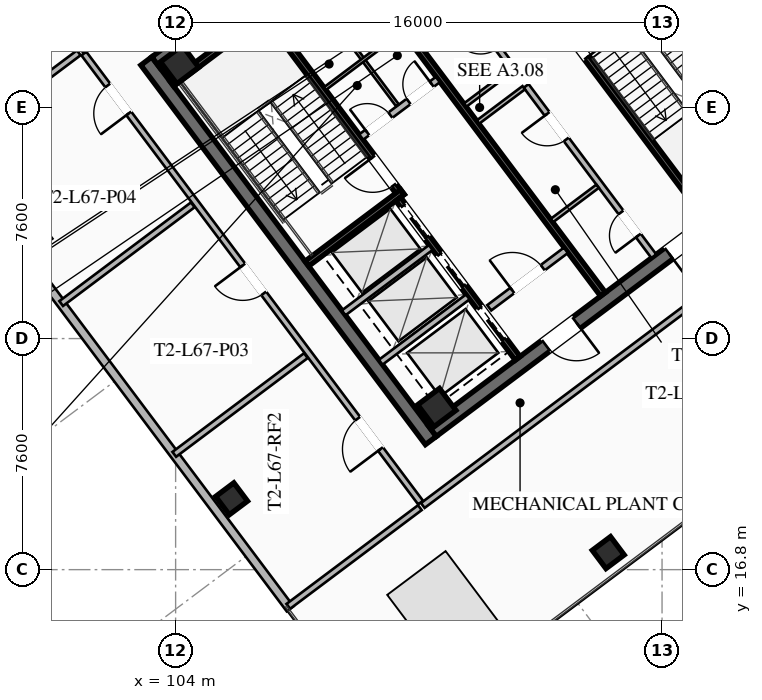
"""IFC4 building model, lengths in metres.
Left out: names, types, materials, properties, quantities, classifications, styles, units other than length and angle.
Written with IfcOpenShell. Run it as: python <this file> out.ifc"""

import sys

from ifc_helpers import new_model, si_unit, direction, frame, frame_2d, origin, origin_2d, place, context, subcontext, project, spatial, rectangle, hollow_rectangle, extrude, element, fill, save


model = new_model("IFC4")
c1 = context("Model", 3, precision=1e-05, world=origin(), true_north=direction((0.0, 1.0)))
c2 = subcontext(c1, "Body", "Model", "MODEL_VIEW")
j1 = project(units=[si_unit("LENGTHUNIT", "METRE"), si_unit("PLANEANGLEUNIT", "RADIAN")], contexts=[c1])
p1 = place(None, origin())
s1 = spatial("IfcSite", under=j1, at=p1, CompositionType="ELEMENT")
p2 = place(p1, origin())
s2 = spatial("IfcBuilding", under=s1, at=p2, CompositionType="ELEMENT")
p3 = place(p2, frame((0.0, 0.0, 246.8)))
s3 = spatial("IfcBuildingStorey", under=s2, at=p3, CompositionType="ELEMENT", Elevation=246.8)
for number, where, z_axis, x_axis in (
    (1, (112.396, 21.047, 0.0), (0.0, 0.0, 1.0), (-0.6, 0.8, 0.0)),
    (2, (115.604, 42.953, 0.0), (0.0, 0.0, 1.0), (0.6, -0.8, 0.0)),
):
    element("IfcWall", number, at=place(p3, frame(where, z_axis=z_axis, x_axis=x_axis)), inside=s3, PredefinedType="SHEAR", context=c2, shape_type="SweptSolid", body=[
        extrude(rectangle(XDim=15.6, YDim=0.45, at=frame_2d((7.8, 0.0))), origin(), (0.0, 0.0, 1.0), 4.6),
    ])
p4 = place(p3, frame((124.649, 30.518, 0.0), z_axis=(0.0, 0.0, 1.0), x_axis=(-0.8, -0.6, 0.0)))
e3 = element("IfcWall", 3, at=p4, inside=s3, PredefinedType="SHEAR", context=c2, shape_type="SweptSolid", body=[
    extrude(rectangle(XDim=15.26, YDim=0.45, at=frame_2d((7.63, 0.0))), origin(), (0.0, 0.0, 1.0), 4.6),
])
p5 = place(p4, frame((9.33, 0.0, 0.0)))
e4 = element("IfcOpeningElement", 4, at=p5, cuts=e3, PredefinedType="OPENING", context=c2, shape_type="SweptSolid", body=[
    extrude(rectangle(XDim=1.25, YDim=2.25, at=frame_2d((0.625, 1.125))), frame((0.0, 0.235, 0.0), z_axis=(0.0, -1.0, 0.0), x_axis=(1.0, 0.0, 0.0)), (0.0, 0.0, 1.0), 0.47),
])
p6 = place(p4, frame((4.28, 0.0, 0.0)))
e5 = element("IfcOpeningElement", 5, at=p6, cuts=e3, PredefinedType="OPENING", context=c2, shape_type="SweptSolid", body=[
    extrude(rectangle(XDim=1.25, YDim=2.25, at=frame_2d((0.625, 1.125))), frame((0.0, 0.235, 0.0), z_axis=(0.0, -1.0, 0.0), x_axis=(1.0, 0.0, 0.0)), (0.0, 0.0, 1.0), 0.47),
])
p7 = place(p3, frame((103.351, 33.482, 0.0), z_axis=(0.0, 0.0, 1.0), x_axis=(0.8, 0.6, 0.0)))
e6 = element("IfcWall", 6, at=p7, inside=s3, PredefinedType="SHEAR", context=c2, shape_type="SweptSolid", body=[
    extrude(rectangle(XDim=15.26, YDim=0.45, at=frame_2d((7.63, 0.0))), origin(), (0.0, 0.0, 1.0), 4.6),
])
p8 = place(p7, frame((4.68, 0.0, 0.0)))
e7 = element("IfcOpeningElement", 7, at=p8, cuts=e6, PredefinedType="OPENING", context=c2, shape_type="SweptSolid", body=[
    extrude(rectangle(XDim=1.25, YDim=2.25, at=frame_2d((0.625, 1.125))), frame((0.0, 0.235, 0.0), z_axis=(0.0, -1.0, 0.0), x_axis=(1.0, 0.0, 0.0)), (0.0, 0.0, 1.0), 0.47),
])
p9 = place(p7, frame((9.73, 0.0, 0.0)))
e8 = element("IfcOpeningElement", 8, at=p9, cuts=e6, PredefinedType="OPENING", context=c2, shape_type="SweptSolid", body=[
    extrude(rectangle(XDim=1.25, YDim=2.25, at=frame_2d((0.625, 1.125))), frame((0.0, 0.235, 0.0), z_axis=(0.0, -1.0, 0.0), x_axis=(1.0, 0.0, 0.0)), (0.0, 0.0, 1.0), 0.47),
])
for number, where, z_axis, x_axis in (
    (9, (112.59, 22.13, 0.0), (0.0, 0.0, 1.0), (0.8, 0.6, 0.0)),
    (10, (104.13, 33.41, 0.0), (0.0, 0.0, 1.0), (0.8, 0.6, 0.0)),
):
    element("IfcColumn", number, at=place(p3, frame(where, z_axis=z_axis, x_axis=x_axis)), inside=s3, PredefinedType="COLUMN", context=c2, shape_type="SweptSolid", body=[
        extrude(hollow_rectangle(XDim=0.9, YDim=0.9, WallThickness=0.04, at=origin_2d()), origin(), (0.0, 0.0, 1.0), 4.38),
    ])
for number, where, z_axis, x_axis in (
    (11, (118.23, 17.36, 0.0), (0.0, 0.0, 1.0), (0.8, 0.6, 0.0)),
    (12, (105.84, 19.13, 0.0), (0.0, 0.0, 1.0), (0.8, 0.6, 0.0)),
):
    element("IfcColumn", number, at=place(p3, frame(where, z_axis=z_axis, x_axis=x_axis)), inside=s3, PredefinedType="COLUMN", context=c2, shape_type="SweptSolid", body=[
        extrude(hollow_rectangle(XDim=0.75, YDim=0.75, WallThickness=0.032, at=origin_2d()), origin(), (0.0, 0.0, 1.0), 4.38),
    ])
for number, where, z_axis, x_axis in (
    (13, (107.766, 15.512, 0.0), (0.0, 0.0, 1.0), (-0.6, 0.8, 0.0)),
    (14, (120.234, 48.488, 0.0), (0.0, 0.0, 1.0), (0.6, -0.8, 0.0)),
):
    element("IfcWall", number, at=place(p3, frame(where, z_axis=z_axis, x_axis=x_axis)), inside=s3, PredefinedType="SOLIDWALL", context=c2, shape_type="SweptSolid", body=[
        extrude(rectangle(XDim=18.9, YDim=0.28, at=frame_2d((9.45, 0.0))), origin(), (0.0, 0.0, 1.0), 4.38),
    ])
p10 = place(p3, frame((111.44, 29.08, 0.0), z_axis=(0.0, 0.0, 1.0), x_axis=(-0.59999041401, 0.800007189403, 0.0)))
e15 = element("IfcWall", 15, at=p10, inside=s3, PredefinedType="SHEAR", context=c2, shape_type="SweptSolid", body=[
    extrude(rectangle(XDim=8.15, YDim=0.2, at=frame_2d((4.075, 0.0))), origin(), (0.0, 0.0, 1.0), 4.38),
])
p11 = place(p10, frame((0.45, 0.0, 0.0)))
e16 = element("IfcOpeningElement", 16, at=p11, cuts=e15, PredefinedType="OPENING", context=c2, shape_type="SweptSolid", body=[
    extrude(rectangle(XDim=1.15, YDim=2.2, at=frame_2d((0.575, 1.1))), frame((0.0, 0.11, 0.0), z_axis=(0.0, -1.0, 0.0), x_axis=(1.0, 0.0, 0.0)), (0.0, 0.0, 1.0), 0.22),
])
for number, where, z_axis, x_axis in (
    (17, (108.316, 26.862, 0.0), (0.0, 0.0, 1.0), (0.8, 0.6, 0.0)),
    (18, (103.876, 32.782, 0.0), (0.0, 0.0, 1.0), (0.8, 0.6, 0.0)),
):
    element("IfcWall", number, at=place(p3, frame(where, z_axis=z_axis, x_axis=x_axis)), inside=s3, PredefinedType="SHEAR", context=c2, shape_type="SweptSolid", body=[
        extrude(rectangle(XDim=3.93, YDim=0.2, at=frame_2d((1.965, 0.0))), origin(), (0.0, 0.0, 1.0), 4.38),
    ])
p12 = place(p3, frame((116.56, 34.92, 0.0), z_axis=(0.0, 0.0, 1.0), x_axis=(0.59999041401, -0.800007189403, 0.0)))
e19 = element("IfcWall", 19, at=p12, inside=s3, PredefinedType="SHEAR", context=c2, shape_type="SweptSolid", body=[
    extrude(rectangle(XDim=8.15, YDim=0.2, at=frame_2d((4.075, 0.0))), origin(), (0.0, 0.0, 1.0), 4.38),
])
p13 = place(p12, frame((0.45, 0.0, 0.0)))
e20 = element("IfcOpeningElement", 20, at=p13, cuts=e19, PredefinedType="OPENING", context=c2, shape_type="SweptSolid", body=[
    extrude(rectangle(XDim=1.15, YDim=2.2, at=frame_2d((0.575, 1.1))), frame((0.0, 0.11, 0.0), z_axis=(0.0, -1.0, 0.0), x_axis=(1.0, 0.0, 0.0)), (0.0, 0.0, 1.0), 0.22),
])
p14 = place(p3, frame((118.058, 25.856, 0.0), z_axis=(0.0, 0.0, 1.0), x_axis=(-0.600002657301, 0.799998007018, 0.0)))
e21 = element("IfcWall", 21, at=p14, inside=s3, PredefinedType="SHEAR", context=c2, shape_type="SweptSolid", body=[
    extrude(rectangle(XDim=14.7, YDim=0.2, at=frame_2d((7.35, 0.0))), origin(), (0.0, 0.0, 1.0), 4.38),
])
p15 = place(p3, frame((110.104, 31.028, 0.0), z_axis=(0.0, 0.0, 1.0), x_axis=(0.800018601094, 0.59997519774, 0.0)))
e22 = element("IfcWall", 22, at=p15, inside=s3, PredefinedType="SOLIDWALL", context=c2, shape_type="SweptSolid", body=[
    extrude(rectangle(XDim=3.15, YDim=0.22, at=frame_2d((1.575, 0.0))), origin(), (0.0, 0.0, 1.0), 3.491),
])
p16 = place(p15, frame((0.25, 0.0, 0.0)))
e23 = element("IfcOpeningElement", 23, at=p16, cuts=e22, PredefinedType="OPENING", context=c2, shape_type="SweptSolid", body=[
    extrude(rectangle(XDim=0.95, YDim=2.05, at=frame_2d((0.475, 1.025))), frame((0.0, 0.12, 0.0), z_axis=(0.0, -1.0, 0.0), x_axis=(1.0, 0.0, 0.0)), (0.0, 0.0, 1.0), 0.24),
])
p17 = place(p15, frame((1.95, 0.0, 0.0)))
e24 = element("IfcOpeningElement", 24, at=p17, cuts=e22, PredefinedType="OPENING", context=c2, shape_type="SweptSolid", body=[
    extrude(rectangle(XDim=0.95, YDim=2.05, at=frame_2d((0.475, 1.025))), frame((0.0, 0.12, 0.0), z_axis=(0.0, -1.0, 0.0), x_axis=(1.0, 0.0, 0.0)), (0.0, 0.0, 1.0), 0.24),
])
p18 = place(p3, frame((114.316, 25.412, 0.0), z_axis=(0.0, 0.0, 1.0), x_axis=(0.800018601094, 0.59997519774, 0.0)))
e25 = element("IfcWall", 25, at=p18, inside=s3, PredefinedType="SOLIDWALL", context=c2, shape_type="SweptSolid", body=[
    extrude(rectangle(XDim=3.15, YDim=0.22, at=frame_2d((1.575, 0.0))), origin(), (0.0, 0.0, 1.0), 3.491),
])
p19 = place(p18, frame((0.95, 0.0, 0.0)))
e26 = element("IfcOpeningElement", 26, at=p19, cuts=e25, PredefinedType="OPENING", context=c2, shape_type="SweptSolid", body=[
    extrude(rectangle(XDim=1.25, YDim=2.25, at=frame_2d((0.625, 1.125))), frame((0.0, 0.12, 0.0), z_axis=(0.0, -1.0, 0.0), x_axis=(1.0, 0.0, 0.0)), (0.0, 0.0, 1.0), 0.24),
])
p20 = place(p3, frame((115.25, 23.75, 0.0), z_axis=(0.0, 0.0, 1.0), x_axis=(-0.599994036198, 0.800004472816, 0.0)))
e27 = element("IfcWall", 27, at=p20, inside=s3, PredefinedType="SHEAR", context=c2, shape_type="SweptSolid", body=[
    extrude(rectangle(XDim=6.55, YDim=0.2, at=frame_2d((3.275, 0.0))), origin(), (0.0, 0.0, 1.0), 4.38),
])
p21 = place(p20, frame((4.975, 0.0, 0.0)))
e28 = element("IfcOpeningElement", 28, at=p21, cuts=e27, PredefinedType="OPENING", context=c2, shape_type="SweptSolid", body=[
    extrude(rectangle(XDim=1.3, YDim=2.25, at=frame_2d((0.65, 1.125))), frame((0.0, 0.11, 0.0), z_axis=(0.0, -1.0, 0.0), x_axis=(1.0, 0.0, 0.0)), (0.0, 0.0, 1.0), 0.22),
])
p22 = place(p20, frame((2.975, 0.0, 0.0)))
e29 = element("IfcOpeningElement", 29, at=p22, cuts=e27, PredefinedType="OPENING", context=c2, shape_type="SweptSolid", body=[
    extrude(rectangle(XDim=1.3, YDim=2.25, at=frame_2d((0.65, 1.125))), frame((0.0, 0.11, 0.0), z_axis=(0.0, -1.0, 0.0), x_axis=(1.0, 0.0, 0.0)), (0.0, 0.0, 1.0), 0.22),
])
p23 = place(p20, frame((0.775, 0.0, 0.0)))
e30 = element("IfcOpeningElement", 30, at=p23, cuts=e27, PredefinedType="OPENING", context=c2, shape_type="SweptSolid", body=[
    extrude(rectangle(XDim=1.3, YDim=2.25, at=frame_2d((0.65, 1.125))), frame((0.0, 0.11, 0.0), z_axis=(0.0, -1.0, 0.0), x_axis=(1.0, 0.0, 0.0)), (0.0, 0.0, 1.0), 0.22),
])
for number, where, z_axis, x_axis in (
    (31, (110.746, 23.622, 0.0), (0.0, 0.0, 1.0), (0.8, 0.6, 0.0)),
    (32, (109.528, 25.246, 0.0), (0.0, 0.0, 1.0), (0.8, 0.6, 0.0)),
):
    element("IfcWall", number, at=place(p3, frame(where, z_axis=z_axis, x_axis=x_axis)), inside=s3, PredefinedType="SOLIDWALL", context=c2, shape_type="SweptSolid", body=[
        extrude(rectangle(XDim=3.58, YDim=0.2, at=frame_2d((1.79, 0.0))), origin(), (0.0, 0.0, 1.0), 4.38),
    ])
p24 = place(p3, frame((111.296, 32.072, 0.0), z_axis=(0.0, 0.0, 1.0), x_axis=(-0.59995887973, 0.800030838552, 0.0)))
e33 = element("IfcWall", 33, at=p24, inside=s3, PredefinedType="PARTITIONING", context=c2, shape_type="SweptSolid", body=[
    extrude(rectangle(XDim=3.8, YDim=0.11, at=frame_2d((1.9, 0.0))), origin(), (0.0, 0.0, 1.0), 3.491),
])
p25 = place(p3, frame((108.91, 32.62, 0.0), z_axis=(0.0, 0.0, 1.0), x_axis=(0.800018601094, 0.59997519774, 0.0)))
e34 = element("IfcWall", 34, at=p25, inside=s3, PredefinedType="PARTITIONING", context=c2, shape_type="SweptSolid", body=[
    extrude(rectangle(XDim=3.15, YDim=0.11, at=frame_2d((1.575, 0.0))), origin(), (0.0, 0.0, 1.0), 3.491),
])
p26 = place(p3, frame((119.73, 27.11, 0.0), z_axis=(0.0, 0.0, 1.0), x_axis=(-0.600005580459, 0.799995814625, 0.0)))
e35 = element("IfcWall", 35, at=p26, inside=s3, PredefinedType="SOLIDWALL", context=c2, shape_type="SweptSolid", body=[
    extrude(rectangle(XDim=7.0, YDim=0.2, at=frame_2d((3.5, 0.0))), origin(), (0.0, 0.0, 1.0), 3.491),
])
p27 = place(p26, frame((0.85, 0.0, 0.0)))
e36 = element("IfcOpeningElement", 36, at=p27, cuts=e35, PredefinedType="OPENING", context=c2, shape_type="SweptSolid", body=[
    extrude(rectangle(XDim=0.95, YDim=2.05, at=frame_2d((0.475, 1.025))), frame((0.0, 0.11, 0.0), z_axis=(0.0, -1.0, 0.0), x_axis=(1.0, 0.0, 0.0)), (0.0, 0.0, 1.0), 0.22),
])
p28 = place(p26, frame((4.8, 0.0, 0.0)))
e37 = element("IfcOpeningElement", 37, at=p28, cuts=e35, PredefinedType="OPENING", context=c2, shape_type="SweptSolid", body=[
    extrude(rectangle(XDim=1.05, YDim=2.2, at=frame_2d((0.525, 1.1))), frame((0.0, 0.11, 0.0), z_axis=(0.0, -1.0, 0.0), x_axis=(1.0, 0.0, 0.0)), (0.0, 0.0, 1.0), 0.22),
])
for number, where, z_axis, x_axis in (
    (38, (113.946, 31.522, 0.0), (0.0, 0.0, 1.0), (0.8, 0.6, 0.0)),
    (39, (116.376, 28.282, 0.0), (0.0, 0.0, 1.0), (0.8, 0.6, 0.0)),
):
    element("IfcWall", number, at=place(p3, frame(where, z_axis=z_axis, x_axis=x_axis)), inside=s3, PredefinedType="PARTITIONING", context=c2, shape_type="SweptSolid", body=[
        extrude(rectangle(XDim=1.88, YDim=0.135, at=frame_2d((0.94, 0.0))), origin(), (0.0, 0.0, 1.0), 3.491),
    ])
p29 = place(p3, frame((115.11, 33.27, 0.0), z_axis=(0.0, 0.0, 1.0), x_axis=(-0.600011160345, 0.79999162962, 0.0)))
e40 = element("IfcWall", 40, at=p29, inside=s3, PredefinedType="SOLIDWALL", context=c2, shape_type="SweptSolid", body=[
    extrude(rectangle(XDim=7.0, YDim=0.2, at=frame_2d((3.5, 0.0))), origin(), (0.0, 0.0, 1.0), 3.491),
])
p30 = place(p29, frame((0.85, 0.0, 0.0)))
e41 = element("IfcOpeningElement", 41, at=p30, cuts=e40, PredefinedType="OPENING", context=c2, shape_type="SweptSolid", body=[
    extrude(rectangle(XDim=0.95, YDim=2.05, at=frame_2d((0.475, 1.025))), frame((0.0, 0.11, 0.0), z_axis=(0.0, -1.0, 0.0), x_axis=(1.0, 0.0, 0.0)), (0.0, 0.0, 1.0), 0.22),
])
p31 = place(p29, frame((4.85, 0.0, 0.0)))
e42 = element("IfcOpeningElement", 42, at=p31, cuts=e40, PredefinedType="OPENING", context=c2, shape_type="SweptSolid", body=[
    extrude(rectangle(XDim=0.95, YDim=2.05, at=frame_2d((0.475, 1.025))), frame((0.0, 0.11, 0.0), z_axis=(0.0, -1.0, 0.0), x_axis=(1.0, 0.0, 0.0)), (0.0, 0.0, 1.0), 0.22),
])
p32 = place(p3, frame((113.526, 32.082, 0.0), z_axis=(0.0, 0.0, 1.0), x_axis=(0.800046745961, 0.599937666993, 0.0)))
e43 = element("IfcWall", 43, at=p32, inside=s3, PredefinedType="PARTITIONING", context=c2, shape_type="SweptSolid", body=[
    extrude(rectangle(XDim=1.88, YDim=0.135, at=frame_2d((0.94, 0.0))), origin(), (0.0, 0.0, 1.0), 3.491),
])
for number, where, z_axis, x_axis in (
    (44, (100.91, 33.87, 0.0), (0.0, 0.0, 1.0), (0.8, 0.6, 0.0)),
    (45, (127.09, 30.13, 0.0), (0.0, 0.0, 1.0), (-0.8, -0.6, 0.0)),
):
    element("IfcWall", number, at=place(p3, frame(where, z_axis=z_axis, x_axis=x_axis)), inside=s3, PredefinedType="SOLIDWALL", context=c2, shape_type="SweptSolid", body=[
        extrude(rectangle(XDim=18.7, YDim=0.2, at=frame_2d((9.35, 0.0))), origin(), (0.0, 0.0, 1.0), 3.491),
    ])
p33 = place(p3, frame((112.058, 19.006, 0.0), z_axis=(0.0, 0.0, 1.0), x_axis=(-0.600010580279, 0.799992064682, 0.0)))
e46 = element("IfcWall", 46, at=p33, inside=s3, PredefinedType="SOLIDWALL", context=c2, shape_type="SweptSolid", body=[
    extrude(rectangle(XDim=18.46, YDim=0.2, at=frame_2d((9.23, 0.0))), origin(), (0.0, 0.0, 1.0), 3.491),
])
p34 = place(p33, frame((2.2, 0.0, 0.0)))
e47 = element("IfcOpeningElement", 47, at=p34, cuts=e46, PredefinedType="OPENING", context=c2, shape_type="SweptSolid", body=[
    extrude(rectangle(XDim=1.25, YDim=2.25, at=frame_2d((0.625, 1.125))), frame((0.0, 0.11, 0.0), z_axis=(0.0, -1.0, 0.0), x_axis=(1.0, 0.0, 0.0)), (0.0, 0.0, 1.0), 0.22),
])
p35 = place(p33, frame((8.6, 0.0, 0.0)))
e48 = element("IfcOpeningElement", 48, at=p35, cuts=e46, PredefinedType="OPENING", context=c2, shape_type="SweptSolid", body=[
    extrude(rectangle(XDim=1.15, YDim=2.2, at=frame_2d((0.575, 1.1))), frame((0.0, 0.11, 0.0), z_axis=(0.0, -1.0, 0.0), x_axis=(1.0, 0.0, 0.0)), (0.0, 0.0, 1.0), 0.22),
])
p36 = place(p33, frame((16.0, 0.0, 0.0)))
e49 = element("IfcOpeningElement", 49, at=p36, cuts=e46, PredefinedType="OPENING", context=c2, shape_type="SweptSolid", body=[
    extrude(rectangle(XDim=1.15, YDim=2.2, at=frame_2d((0.575, 1.1))), frame((0.0, 0.11, 0.0), z_axis=(0.0, -1.0, 0.0), x_axis=(1.0, 0.0, 0.0)), (0.0, 0.0, 1.0), 0.22),
])
for number, where, z_axis, x_axis in (
    (50, (96.486, 30.552, 0.0), (0.0, 0.0, 1.0), (0.8, 0.6, 0.0)),
    (51, (107.706, 15.592, 0.0), (0.0, 0.0, 1.0), (0.8, 0.6, 0.0)),
    (52, (100.236, 25.552, 0.0), (0.0, 0.0, 1.0), (0.8, 0.6, 0.0)),
    (53, (103.956, 20.592, 0.0), (0.0, 0.0, 1.0), (0.8, 0.6, 0.0)),
):
    element("IfcWall", number, at=place(p3, frame(where, z_axis=z_axis, x_axis=x_axis)), inside=s3, PredefinedType="SOLIDWALL", context=c2, shape_type="SweptSolid", body=[
        extrude(rectangle(XDim=5.41, YDim=0.2, at=frame_2d((2.705, 0.0))), origin(), (0.0, 0.0, 1.0), 3.491),
    ])
p37 = place(p5, origin())
e54 = element("IfcDoor", 54, at=p37, inside=s3, OperationType="SINGLE_SWING_LEFT", PredefinedType="DOOR", context=c2, shape_type="SweptSolid", body=[
    extrude(rectangle(XDim=1.25, YDim=2.25, at=frame_2d((0.625, 1.125))), frame((0.0, 0.025, 0.0), z_axis=(0.0, -1.0, 0.0), x_axis=(1.0, 0.0, 0.0)), (0.0, 0.0, 1.0), 0.05),
])
fill(e4, e54)
p38 = place(p6, origin())
e55 = element("IfcDoor", 55, at=p38, inside=s3, OperationType="SINGLE_SWING_RIGHT", PredefinedType="DOOR", context=c2, shape_type="SweptSolid", body=[
    extrude(rectangle(XDim=1.25, YDim=2.25, at=frame_2d((0.625, 1.125))), frame((0.0, 0.025, 0.0), z_axis=(0.0, -1.0, 0.0), x_axis=(1.0, 0.0, 0.0)), (0.0, 0.0, 1.0), 0.05),
])
fill(e5, e55)
p39 = place(p11, origin())
e56 = element("IfcDoor", 56, at=p39, inside=s3, OperationType="SINGLE_SWING_RIGHT", PredefinedType="DOOR", context=c2, shape_type="SweptSolid", body=[
    extrude(rectangle(XDim=1.15, YDim=2.2, at=frame_2d((0.575, 1.1))), frame((0.0, 0.025, 0.0), z_axis=(0.0, -1.0, 0.0), x_axis=(1.0, 0.0, 0.0)), (0.0, 0.0, 1.0), 0.05),
])
fill(e16, e56)
p40 = place(p13, origin())
e57 = element("IfcDoor", 57, at=p40, inside=s3, OperationType="SINGLE_SWING_RIGHT", PredefinedType="DOOR", context=c2, shape_type="SweptSolid", body=[
    extrude(rectangle(XDim=1.15, YDim=2.2, at=frame_2d((0.575, 1.1))), frame((0.0, 0.025, 0.0), z_axis=(0.0, -1.0, 0.0), x_axis=(1.0, 0.0, 0.0)), (0.0, 0.0, 1.0), 0.05),
])
fill(e20, e57)
p41 = place(p19, origin())
e58 = element("IfcDoor", 58, at=p41, inside=s3, OperationType="SINGLE_SWING_LEFT", PredefinedType="DOOR", context=c2, shape_type="SweptSolid", body=[
    extrude(rectangle(XDim=1.25, YDim=2.25, at=frame_2d((0.625, 1.125))), frame((0.0, 0.025, 0.0), z_axis=(0.0, -1.0, 0.0), x_axis=(1.0, 0.0, 0.0)), (0.0, 0.0, 1.0), 0.05),
])
fill(e26, e58)
p42 = place(p16, origin())
e59 = element("IfcDoor", 59, at=p42, inside=s3, OperationType="SINGLE_SWING_LEFT", PredefinedType="DOOR", context=c2, shape_type="SweptSolid", body=[
    extrude(rectangle(XDim=0.95, YDim=2.05, at=frame_2d((0.475, 1.025))), frame((0.0, 0.025, 0.0), z_axis=(0.0, -1.0, 0.0), x_axis=(1.0, 0.0, 0.0)), (0.0, 0.0, 1.0), 0.05),
])
fill(e23, e59)
p43 = place(p17, origin())
e60 = element("IfcDoor", 60, at=p43, inside=s3, OperationType="SINGLE_SWING_RIGHT", PredefinedType="DOOR", context=c2, shape_type="SweptSolid", body=[
    extrude(rectangle(XDim=0.95, YDim=2.05, at=frame_2d((0.475, 1.025))), frame((0.0, 0.025, 0.0), z_axis=(0.0, -1.0, 0.0), x_axis=(1.0, 0.0, 0.0)), (0.0, 0.0, 1.0), 0.05),
])
fill(e24, e60)
p44 = place(p27, origin())
e61 = element("IfcDoor", 61, at=p44, inside=s3, OperationType="SINGLE_SWING_LEFT", PredefinedType="DOOR", context=c2, shape_type="SweptSolid", body=[
    extrude(rectangle(XDim=0.95, YDim=2.05, at=frame_2d((0.475, 1.025))), frame((0.0, 0.025, 0.0), z_axis=(0.0, -1.0, 0.0), x_axis=(1.0, 0.0, 0.0)), (0.0, 0.0, 1.0), 0.05),
])
fill(e36, e61)
p45 = place(p28, origin())
e62 = element("IfcDoor", 62, at=p45, inside=s3, OperationType="SINGLE_SWING_RIGHT", PredefinedType="DOOR", context=c2, shape_type="SweptSolid", body=[
    extrude(rectangle(XDim=1.05, YDim=2.2, at=frame_2d((0.525, 1.1))), frame((0.0, 0.025, 0.0), z_axis=(0.0, -1.0, 0.0), x_axis=(1.0, 0.0, 0.0)), (0.0, 0.0, 1.0), 0.05),
])
fill(e37, e62)
p46 = place(p34, origin())
e63 = element("IfcDoor", 63, at=p46, inside=s3, OperationType="SINGLE_SWING_LEFT", PredefinedType="DOOR", context=c2, shape_type="SweptSolid", body=[
    extrude(rectangle(XDim=1.25, YDim=2.25, at=frame_2d((0.625, 1.125))), frame((0.0, 0.025, 0.0), z_axis=(0.0, -1.0, 0.0), x_axis=(1.0, 0.0, 0.0)), (0.0, 0.0, 1.0), 0.05),
])
fill(e47, e63)
p47 = place(p35, origin())
e64 = element("IfcDoor", 64, at=p47, inside=s3, OperationType="SINGLE_SWING_RIGHT", PredefinedType="DOOR", context=c2, shape_type="SweptSolid", body=[
    extrude(rectangle(XDim=1.15, YDim=2.2, at=frame_2d((0.575, 1.1))), frame((0.0, 0.025, 0.0), z_axis=(0.0, -1.0, 0.0), x_axis=(1.0, 0.0, 0.0)), (0.0, 0.0, 1.0), 0.05),
])
fill(e48, e64)
p48 = place(p36, origin())
e65 = element("IfcDoor", 65, at=p48, inside=s3, OperationType="SINGLE_SWING_LEFT", PredefinedType="DOOR", context=c2, shape_type="SweptSolid", body=[
    extrude(rectangle(XDim=1.15, YDim=2.2, at=frame_2d((0.575, 1.1))), frame((0.0, 0.025, 0.0), z_axis=(0.0, -1.0, 0.0), x_axis=(1.0, 0.0, 0.0)), (0.0, 0.0, 1.0), 0.05),
])
fill(e49, e65)
p49 = place(p21, origin())
e66 = element("IfcDoor", 66, at=p49, inside=s3, OperationType="SLIDING_TO_LEFT", PredefinedType="DOOR", context=c2, shape_type="SweptSolid", body=[
    extrude(rectangle(XDim=1.3, YDim=2.25, at=frame_2d((0.65, 1.125))), frame((0.0, 0.025, 0.0), z_axis=(0.0, -1.0, 0.0), x_axis=(1.0, 0.0, 0.0)), (0.0, 0.0, 1.0), 0.05),
])
fill(e28, e66)
p50 = place(p22, origin())
e67 = element("IfcDoor", 67, at=p50, inside=s3, OperationType="SLIDING_TO_LEFT", PredefinedType="DOOR", context=c2, shape_type="SweptSolid", body=[
    extrude(rectangle(XDim=1.3, YDim=2.25, at=frame_2d((0.65, 1.125))), frame((0.0, 0.025, 0.0), z_axis=(0.0, -1.0, 0.0), x_axis=(1.0, 0.0, 0.0)), (0.0, 0.0, 1.0), 0.05),
])
fill(e29, e67)
p51 = place(p23, origin())
e68 = element("IfcDoor", 68, at=p51, inside=s3, OperationType="SLIDING_TO_LEFT", PredefinedType="DOOR", context=c2, shape_type="SweptSolid", body=[
    extrude(rectangle(XDim=1.3, YDim=2.25, at=frame_2d((0.65, 1.125))), frame((0.0, 0.025, 0.0), z_axis=(0.0, -1.0, 0.0), x_axis=(1.0, 0.0, 0.0)), (0.0, 0.0, 1.0), 0.05),
])
fill(e30, e68)
save(model, sys.argv[1])
